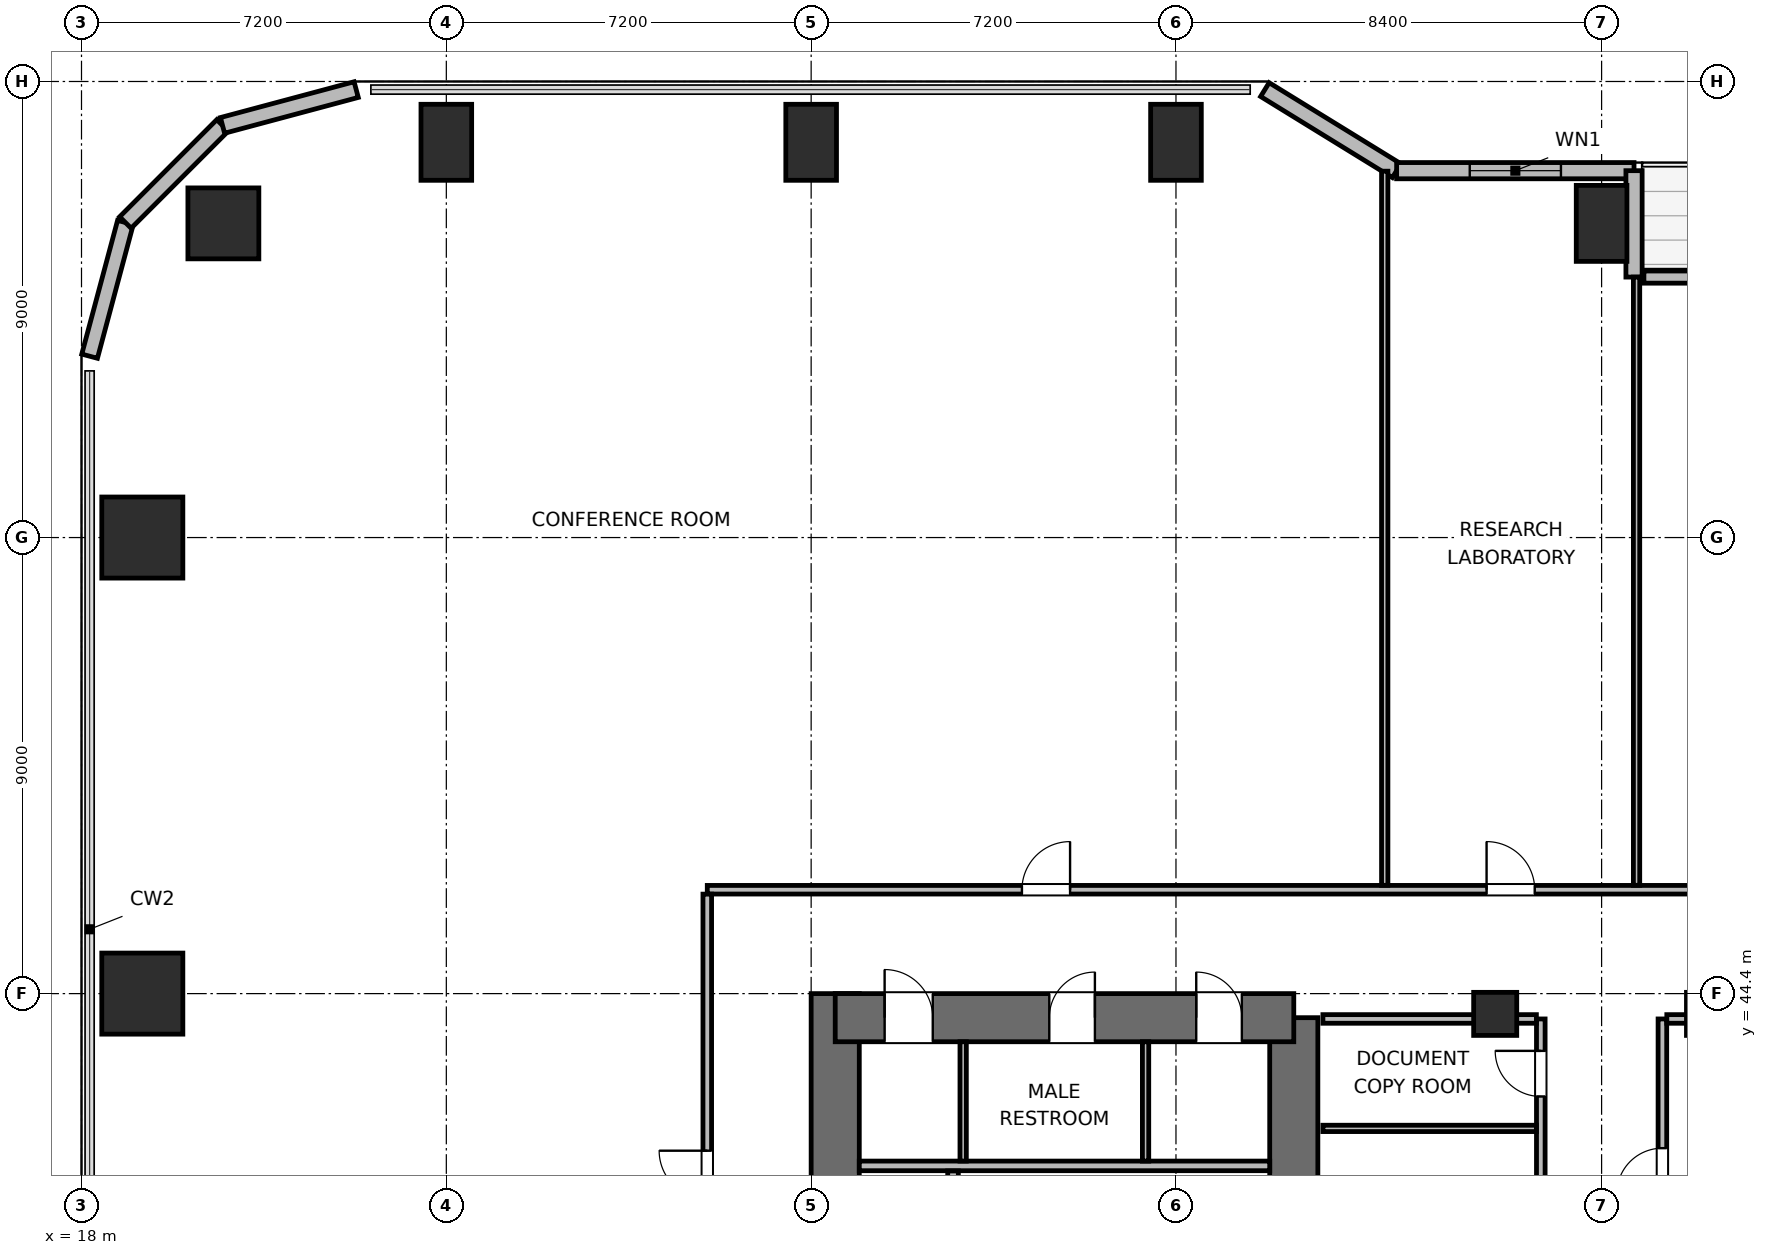
"""IFC4 building model, lengths in metres.
Left out: names, types, materials, properties, quantities, classifications, styles, units other than length and angle.
Written with IfcOpenShell. Run it as: python <this file> out.ifc"""

import sys

from ifc_helpers import new_model, si_unit, direction, frame, frame_2d, origin, origin_2d, place, context, subcontext, project, spatial, rectangle, circle, extrude, element, fill, save


model = new_model("IFC4")
c1 = context("Model", 3, precision=1e-05, world=origin(), true_north=direction((0.0, 1.0)))
c2 = subcontext(c1, "Body", "Model", "MODEL_VIEW")
j1 = project(units=[si_unit("LENGTHUNIT", "METRE"), si_unit("PLANEANGLEUNIT", "RADIAN")], contexts=[c1])
p1 = place(None, origin())
s1 = spatial("IfcSite", under=j1, at=p1, CompositionType="ELEMENT")
p2 = place(p1, origin())
s2 = spatial("IfcBuilding", under=s1, at=p2, CompositionType="ELEMENT")
p3 = place(p2, frame((0.0, 0.0, 29.4)))
s3 = spatial("IfcBuildingStorey", under=s2, at=p3, CompositionType="ELEMENT", Elevation=29.4)
p4 = place(p3, frame((32.875, 27.6, 0.0), z_axis=(0.0, 0.0, 1.0), x_axis=(0.0, 1.0, 0.0)))
e1 = element("IfcWall", 1, at=p4, inside=s3, PredefinedType="SHEAR", context=c2, shape_type="SweptSolid", body=[
    extrude(rectangle(XDim=16.8, YDim=0.95, at=frame_2d((8.4, 0.0))), origin(), (0.0, 0.0, 1.0), 3.9),
])
p5 = place(p3, frame((41.925, 37.8, 0.0), z_axis=(0.0, 0.0, 1.0), x_axis=(0.0, 1.0, 0.0)))
e2 = element("IfcWall", 2, at=p5, inside=s3, PredefinedType="SHEAR", context=c2, shape_type="SweptSolid", body=[
    extrude(rectangle(XDim=6.125, YDim=0.95, at=frame_2d((3.062, 0.0))), origin(), (0.0, 0.0, 1.0), 3.9),
])
p6 = place(p3, frame((32.875, 43.925, 0.0), z_axis=(0.0, 0.0, 1.0), x_axis=(1.0, 0.0, 0.0)))
e3 = element("IfcWall", 3, at=p6, inside=s3, PredefinedType="SHEAR", context=c2, shape_type="SweptSolid", body=[
    extrude(rectangle(XDim=9.05, YDim=0.95, at=frame_2d((4.525, 0.0))), origin(), (0.0, 0.0, 1.0), 3.9),
])
p7 = place(p6, frame((0.975, 0.0, 0.0)))
e4 = element("IfcOpeningElement", 4, at=p7, cuts=e3, PredefinedType="OPENING", context=c2, shape_type="SweptSolid", body=[
    extrude(rectangle(XDim=0.95, YDim=2.04, at=frame_2d((0.475, 1.02))), frame((0.0, 0.485, 0.0), z_axis=(0.0, -1.0, 0.0), x_axis=(1.0, 0.0, 0.0)), (0.0, 0.0, 1.0), 0.97),
])
p8 = place(p6, frame((4.225, 0.0, 0.0)))
e5 = element("IfcOpeningElement", 5, at=p8, cuts=e3, PredefinedType="OPENING", context=c2, shape_type="SweptSolid", body=[
    extrude(rectangle(XDim=0.9, YDim=2.02, at=frame_2d((0.45, 1.01))), frame((0.0, 0.485, 0.0), z_axis=(0.0, -1.0, 0.0), x_axis=(1.0, 0.0, 0.0)), (0.0, 0.0, 1.0), 0.97),
])
p9 = place(p6, frame((7.125, 0.0, 0.0)))
e6 = element("IfcOpeningElement", 6, at=p9, cuts=e3, PredefinedType="OPENING", context=c2, shape_type="SweptSolid", body=[
    extrude(rectangle(XDim=0.9, YDim=2.02, at=frame_2d((0.45, 1.01))), frame((0.0, 0.485, 0.0), z_axis=(0.0, -1.0, 0.0), x_axis=(1.0, 0.0, 0.0)), (0.0, 0.0, 1.0), 0.97),
])
p10 = place(p3, frame((20.8, 59.6, 0.0), z_axis=(0.0, 0.0, 1.0), x_axis=(1.0, 0.0, 0.0)))
e7 = element("IfcColumn", 7, at=p10, inside=s3, PredefinedType="COLUMN", context=c2, shape_type="SweptSolid", body=[
    extrude(circle(Radius=0.7, at=origin_2d()), origin(), (0.0, 0.0, 1.0), 3.9),
])
for number, where, z_axis, x_axis in (
    (8, (25.2, 61.2, 0.0), (0.0, 0.0, 1.0), (1.0, 0.0, 0.0)),
    (9, (32.4, 61.2, 0.0), (0.0, 0.0, 1.0), (1.0, 0.0, 0.0)),
    (10, (39.6, 61.2, 0.0), (0.0, 0.0, 1.0), (1.0, 0.0, 0.0)),
    (11, (48.0, 59.6, 0.0), (0.0, 0.0, 1.0), (1.0, 0.0, 0.0)),
):
    element("IfcColumn", number, at=place(p3, frame(where, z_axis=z_axis, x_axis=x_axis)), inside=s3, PredefinedType="COLUMN", context=c2, shape_type="SweptSolid", body=[
        extrude(rectangle(XDim=1.0, YDim=1.5, at=origin_2d()), origin(), (0.0, 0.0, 1.0), 3.9),
    ])
for number, where, z_axis, x_axis in (
    (12, (19.2, 44.4, 0.0), (0.0, 0.0, 1.0), (1.0, 0.0, 0.0)),
    (13, (19.2, 53.4, 0.0), (0.0, 0.0, 1.0), (1.0, 0.0, 0.0)),
):
    element("IfcColumn", number, at=place(p3, frame(where, z_axis=z_axis, x_axis=x_axis)), inside=s3, PredefinedType="COLUMN", context=c2, shape_type="SweptSolid", body=[
        extrude(rectangle(XDim=1.6, YDim=1.6, at=origin_2d()), origin(), (0.0, 0.0, 1.0), 3.9),
    ])
for number, where, z_axis, x_axis in (
    (14, (45.9, 44.0, 0.0), (0.0, 0.0, 1.0), (1.0, 0.0, 0.0)),
    (15, (50.1, 44.0, 0.0), (0.0, 0.0, 1.0), (1.0, 0.0, 0.0)),
):
    element("IfcColumn", number, at=place(p3, frame(where, z_axis=z_axis, x_axis=x_axis)), inside=s3, PredefinedType="COLUMN", context=c2, shape_type="SweptSolid", body=[
        extrude(rectangle(XDim=0.85, YDim=0.85, at=origin_2d()), origin(), (0.0, 0.0, 1.0), 3.9),
    ])
p11 = place(p3, frame((18.16, 56.979, 0.0), z_axis=(0.0, 0.0, 1.0), x_axis=(0.25869736047, 0.965958423373, 0.0)))
e16 = element("IfcWall", 16, at=p11, inside=s3, PredefinedType="SOLIDWALL", context=c2, shape_type="SweptSolid", body=[
    extrude(rectangle(XDim=2.731, YDim=0.32, at=frame_2d((1.366, 0.0))), origin(), (0.0, 0.0, 1.0), 3.64),
])
p12 = place(p3, frame((18.866, 59.617, 0.0), z_axis=(0.0, 0.0, 1.0), x_axis=(0.707106781187, 0.707106781187, 0.0)))
e17 = element("IfcWall", 17, at=p12, inside=s3, PredefinedType="SOLIDWALL", context=c2, shape_type="SweptSolid", body=[
    extrude(rectangle(XDim=2.71, YDim=0.32, at=frame_2d((1.355, 0.0))), origin(), (0.0, 0.0, 1.0), 3.64),
])
p13 = place(p3, frame((20.783, 61.533, 0.0), z_axis=(0.0, 0.0, 1.0), x_axis=(0.965964405026, 0.25867502435, 0.0)))
e18 = element("IfcWall", 18, at=p13, inside=s3, PredefinedType="SOLIDWALL", context=c2, shape_type="SweptSolid", body=[
    extrude(rectangle(XDim=2.731, YDim=0.32, at=frame_2d((1.366, 0.0))), origin(), (0.0, 0.0, 1.0), 3.64),
])
p14 = place(p3, frame((41.355, 62.24, 0.0), z_axis=(0.0, 0.0, 1.0), x_axis=(0.851630857047, -0.524142044989, 0.0)))
e19 = element("IfcWall", 19, at=p14, inside=s3, PredefinedType="SOLIDWALL", context=c2, shape_type="SweptSolid", body=[
    extrude(rectangle(XDim=3.053, YDim=0.32, at=frame_2d((1.526, 0.0))), origin(), (0.0, 0.0, 1.0), 2.875),
])
p15 = place(p3, frame((43.955, 60.64, 0.0), z_axis=(0.0, 0.0, 1.0), x_axis=(1.0, 0.0, 0.0)))
e20 = element("IfcWall", 20, at=p15, inside=s3, PredefinedType="SOLIDWALL", context=c2, shape_type="SweptSolid", body=[
    extrude(rectangle(XDim=4.685, YDim=0.32, at=frame_2d((2.343, 0.0))), origin(), (0.0, 0.0, 1.0), 2.875),
])
p16 = place(p15, frame((1.443, 0.0, 0.85)))
e21 = element("IfcOpeningElement", 21, at=p16, cuts=e20, PredefinedType="OPENING", context=c2, shape_type="SweptSolid", body=[
    extrude(rectangle(XDim=1.8, YDim=1.1, at=frame_2d((0.9, 0.55))), frame((0.0, 0.17, 0.0), z_axis=(0.0, -1.0, 0.0), x_axis=(1.0, 0.0, 0.0)), (0.0, 0.0, 1.0), 0.34),
])
p17 = place(p3, frame((48.64, 60.64, 0.0), z_axis=(0.0, 0.0, 1.0), x_axis=(0.0, -1.0, 0.0)))
e22 = element("IfcWall", 22, at=p17, inside=s3, PredefinedType="SOLIDWALL", context=c2, shape_type="SweptSolid", body=[
    extrude(rectangle(XDim=2.1, YDim=0.32, at=frame_2d((1.05, 0.0))), origin(), (0.0, 0.0, 1.0), 2.875),
])
p18 = place(p3, frame((48.835, 58.54, 0.0), z_axis=(0.0, 0.0, 1.0), x_axis=(1.0, 0.0, 0.0)))
e23 = element("IfcWall", 23, at=p18, inside=s3, PredefinedType="SOLIDWALL", context=c2, shape_type="SweptSolid", body=[
    extrude(rectangle(XDim=4.53, YDim=0.24, at=frame_2d((2.265, 0.0))), origin(), (0.0, 0.0, 1.0), 3.64),
])
p19 = place(p18, frame((1.715, 0.0, 0.0)))
e24 = element("IfcOpeningElement", 24, at=p19, cuts=e23, PredefinedType="OPENING", context=c2, shape_type="SweptSolid", body=[
    extrude(rectangle(XDim=1.1, YDim=2.04, at=frame_2d((0.55, 1.02))), frame((0.0, 0.13, 0.0), z_axis=(0.0, -1.0, 0.0), x_axis=(1.0, 0.0, 0.0)), (0.0, 0.0, 1.0), 0.26),
])
p20 = place(p3, frame((33.35, 41.0, 0.0), z_axis=(0.0, 0.0, 1.0), x_axis=(1.0, 0.0, 0.0)))
e25 = element("IfcWall", 25, at=p20, inside=s3, PredefinedType="PLUMBINGWALL", context=c2, shape_type="SweptSolid", body=[
    extrude(rectangle(XDim=8.1, YDim=0.19, at=frame_2d((4.05, 0.0))), origin(), (0.0, 0.0, 1.0), 3.64),
])
for number, where, z_axis, x_axis in (
    (26, (35.4, 41.095, 0.0), (0.0, 0.0, 1.0), (0.0, 1.0, 0.0)),
    (27, (39.0, 41.095, 0.0), (0.0, 0.0, 1.0), (0.0, 1.0, 0.0)),
):
    element("IfcWall", number, at=place(p3, frame(where, z_axis=z_axis, x_axis=x_axis)), inside=s3, PredefinedType="PARTITIONING", context=c2, shape_type="SweptSolid", body=[
        extrude(rectangle(XDim=2.355, YDim=0.125, at=frame_2d((1.177, 0.0))), origin(), (0.0, 0.0, 1.0), 3.64),
    ])
p21 = place(p3, frame((35.2, 39.58, 0.0), z_axis=(0.0, 0.0, 1.0), x_axis=(0.0, 1.0, 0.0)))
e28 = element("IfcWall", 28, at=p21, inside=s3, PredefinedType="PARTITIONING", context=c2, shape_type="SweptSolid", body=[
    extrude(rectangle(XDim=1.32, YDim=0.21, at=frame_2d((0.66, 0.0))), origin(), (0.0, 0.0, 1.0), 3.64),
])
p22 = place(p3, frame((46.8, 37.9, 0.0), z_axis=(0.0, 0.0, 1.0), x_axis=(0.0, 1.0, 0.0)))
e29 = element("IfcWall", 29, at=p22, inside=s3, PredefinedType="PARTITIONING", context=c2, shape_type="SweptSolid", body=[
    extrude(rectangle(XDim=6.0, YDim=0.17, at=frame_2d((3.0, 0.0))), origin(), (0.0, 0.0, 1.0), 3.64),
])
p23 = place(p22, frame((1.47, 0.0, 0.0)))
e30 = element("IfcOpeningElement", 30, at=p23, cuts=e29, PredefinedType="OPENING", context=c2, shape_type="SweptSolid", body=[
    extrude(rectangle(XDim=0.9, YDim=2.02, at=frame_2d((0.45, 1.01))), frame((0.0, 0.095, 0.0), z_axis=(0.0, -1.0, 0.0), x_axis=(1.0, 0.0, 0.0)), (0.0, 0.0, 1.0), 0.19),
])
p24 = place(p22, frame((4.47, 0.0, 0.0)))
e31 = element("IfcOpeningElement", 31, at=p24, cuts=e29, PredefinedType="OPENING", context=c2, shape_type="SweptSolid", body=[
    extrude(rectangle(XDim=0.9, YDim=2.02, at=frame_2d((0.45, 1.01))), frame((0.0, 0.095, 0.0), z_axis=(0.0, -1.0, 0.0), x_axis=(1.0, 0.0, 0.0)), (0.0, 0.0, 1.0), 0.19),
])
p25 = place(p3, frame((42.5, 43.9, 0.0), z_axis=(0.0, 0.0, 1.0), x_axis=(1.0, 0.0, 0.0)))
e32 = element("IfcWall", 32, at=p25, inside=s3, PredefinedType="PARTITIONING", context=c2, shape_type="SweptSolid", body=[
    extrude(rectangle(XDim=4.213, YDim=0.17, at=frame_2d((2.106, 0.0))), origin(), (0.0, 0.0, 1.0), 2.525),
])
p26 = place(p3, frame((42.5, 41.74, 0.0), z_axis=(0.0, 0.0, 1.0), x_axis=(1.0, 0.0, 0.0)))
e33 = element("IfcWall", 33, at=p26, inside=s3, PredefinedType="PARTITIONING", context=c2, shape_type="SweptSolid", body=[
    extrude(rectangle(XDim=4.213, YDim=0.125, at=frame_2d((2.106, 0.0))), origin(), (0.0, 0.0, 1.0), 3.64),
])
p27 = place(p3, frame((49.2, 37.9, 0.0), z_axis=(0.0, 0.0, 1.0), x_axis=(0.0, 1.0, 0.0)))
e34 = element("IfcWall", 34, at=p27, inside=s3, PredefinedType="PARTITIONING", context=c2, shape_type="SweptSolid", body=[
    extrude(rectangle(XDim=6.0, YDim=0.17, at=frame_2d((3.0, 0.0))), origin(), (0.0, 0.0, 1.0), 3.64),
])
p28 = place(p27, frame((2.55, 0.0, 0.0)))
e35 = element("IfcOpeningElement", 35, at=p28, cuts=e34, PredefinedType="OPENING", context=c2, shape_type="SweptSolid", body=[
    extrude(rectangle(XDim=0.9, YDim=2.02, at=frame_2d((0.45, 1.01))), frame((0.0, 0.095, 0.0), z_axis=(0.0, -1.0, 0.0), x_axis=(1.0, 0.0, 0.0)), (0.0, 0.0, 1.0), 0.19),
])
p29 = place(p3, frame((49.287, 43.9, 0.0), z_axis=(0.0, 0.0, 1.0), x_axis=(1.0, 0.0, 0.0)))
e36 = element("IfcWall", 36, at=p29, inside=s3, PredefinedType="PARTITIONING", context=c2, shape_type="SweptSolid", body=[
    extrude(rectangle(XDim=4.113, YDim=0.17, at=frame_2d((2.056, 0.0))), origin(), (0.0, 0.0, 1.0), 2.525),
])
p30 = place(p3, frame((30.35, 46.45, 0.0), z_axis=(0.0, 0.0, 1.0), x_axis=(1.0, 0.0, 0.0)))
e37 = element("IfcWall", 37, at=p30, inside=s3, PredefinedType="PARTITIONING", context=c2, shape_type="SweptSolid", body=[
    extrude(rectangle(XDim=35.3, YDim=0.17, at=frame_2d((17.65, 0.0))), origin(), (0.0, 0.0, 1.0), 3.64),
])
p31 = place(p30, frame((6.21, 0.0, 0.0)))
e38 = element("IfcOpeningElement", 38, at=p31, cuts=e37, PredefinedType="OPENING", context=c2, shape_type="SweptSolid", body=[
    extrude(rectangle(XDim=0.95, YDim=2.04, at=frame_2d((0.475, 1.02))), frame((0.0, 0.095, 0.0), z_axis=(0.0, -1.0, 0.0), x_axis=(1.0, 0.0, 0.0)), (0.0, 0.0, 1.0), 0.19),
])
p32 = place(p30, frame((15.38, 0.0, 0.0)))
e39 = element("IfcOpeningElement", 39, at=p32, cuts=e37, PredefinedType="OPENING", context=c2, shape_type="SweptSolid", body=[
    extrude(rectangle(XDim=0.95, YDim=2.04, at=frame_2d((0.475, 1.02))), frame((0.0, 0.095, 0.0), z_axis=(0.0, -1.0, 0.0), x_axis=(1.0, 0.0, 0.0)), (0.0, 0.0, 1.0), 0.19),
])
p33 = place(p30, frame((26.345, 0.0, 0.0)))
e40 = element("IfcOpeningElement", 40, at=p33, cuts=e37, PredefinedType="OPENING", context=c2, shape_type="SweptSolid", body=[
    extrude(rectangle(XDim=0.95, YDim=2.04, at=frame_2d((0.475, 1.02))), frame((0.0, 0.095, 0.0), z_axis=(0.0, -1.0, 0.0), x_axis=(1.0, 0.0, 0.0)), (0.0, 0.0, 1.0), 0.19),
])
p34 = place(p3, frame((30.35, 25.637, 0.0), z_axis=(0.0, 0.0, 1.0), x_axis=(0.0, 1.0, 0.0)))
e41 = element("IfcWall", 41, at=p34, inside=s3, PredefinedType="PARTITIONING", context=c2, shape_type="SweptSolid", body=[
    extrude(rectangle(XDim=20.726, YDim=0.17, at=frame_2d((10.363, 0.0))), origin(), (0.0, 0.0, 1.0), 3.64),
])
p35 = place(p34, frame((4.263, 0.0, 0.0)))
e42 = element("IfcOpeningElement", 42, at=p35, cuts=e41, PredefinedType="OPENING", context=c2, shape_type="SweptSolid", body=[
    extrude(rectangle(XDim=0.95, YDim=2.04, at=frame_2d((0.475, 1.02))), frame((0.0, 0.095, 0.0), z_axis=(0.0, -1.0, 0.0), x_axis=(1.0, 0.0, 0.0)), (0.0, 0.0, 1.0), 0.19),
])
p36 = place(p34, frame((14.713, 0.0, 0.0)))
e43 = element("IfcOpeningElement", 43, at=p36, cuts=e41, PredefinedType="OPENING", context=c2, shape_type="SweptSolid", body=[
    extrude(rectangle(XDim=0.95, YDim=2.04, at=frame_2d((0.475, 1.02))), frame((0.0, 0.095, 0.0), z_axis=(0.0, -1.0, 0.0), x_axis=(1.0, 0.0, 0.0)), (0.0, 0.0, 1.0), 0.19),
])
p37 = place(p3, frame((43.72, 46.537, 0.0), z_axis=(0.0, 0.0, 1.0), x_axis=(0.0, 1.0, 0.0)))
e44 = element("IfcWall", 44, at=p37, inside=s3, PredefinedType="PARTITIONING", context=c2, shape_type="SweptSolid", body=[
    extrude(rectangle(XDim=14.093, YDim=0.125, at=frame_2d((7.046, 0.0))), origin(), (0.0, 0.0, 1.0), 3.003),
])
p38 = place(p3, frame((48.69, 46.537, 0.0), z_axis=(0.0, 0.0, 1.0), x_axis=(0.0, 1.0, 0.0)))
e45 = element("IfcWall", 45, at=p38, inside=s3, PredefinedType="PARTITIONING", context=c2, shape_type="SweptSolid", body=[
    extrude(rectangle(XDim=12.003, YDim=0.125, at=frame_2d((6.001, 0.0))), origin(), (0.0, 0.0, 1.0), 3.64),
])
p39 = place(p16, origin())
e46 = element("IfcWindow", 46, at=p39, inside=s3, PartitioningType="SINGLE_PANEL", PredefinedType="WINDOW", context=c2, shape_type="SweptSolid", body=[
    extrude(rectangle(XDim=1.8, YDim=1.1, at=frame_2d((0.9, 0.55))), frame((0.0, 0.03, 0.0), z_axis=(0.0, -1.0, 0.0), x_axis=(1.0, 0.0, 0.0)), (0.0, 0.0, 1.0), 0.06),
])
fill(e21, e46)
p40 = place(p7, origin())
e47 = element("IfcDoor", 47, at=p40, inside=s3, OperationType="SINGLE_SWING_LEFT", PredefinedType="DOOR", context=c2, shape_type="SweptSolid", body=[
    extrude(rectangle(XDim=0.95, YDim=2.04, at=frame_2d((0.475, 1.02))), frame((0.0, 0.025, 0.0), z_axis=(0.0, -1.0, 0.0), x_axis=(1.0, 0.0, 0.0)), (0.0, 0.0, 1.0), 0.05),
])
fill(e4, e47)
p41 = place(p8, origin())
e48 = element("IfcDoor", 48, at=p41, inside=s3, OperationType="SINGLE_SWING_RIGHT", PredefinedType="DOOR", context=c2, shape_type="SweptSolid", body=[
    extrude(rectangle(XDim=0.9, YDim=2.02, at=frame_2d((0.45, 1.01))), frame((0.0, 0.025, 0.0), z_axis=(0.0, -1.0, 0.0), x_axis=(1.0, 0.0, 0.0)), (0.0, 0.0, 1.0), 0.05),
])
fill(e5, e48)
p42 = place(p9, origin())
e49 = element("IfcDoor", 49, at=p42, inside=s3, OperationType="SINGLE_SWING_LEFT", PredefinedType="DOOR", context=c2, shape_type="SweptSolid", body=[
    extrude(rectangle(XDim=0.9, YDim=2.02, at=frame_2d((0.45, 1.01))), frame((0.0, 0.025, 0.0), z_axis=(0.0, -1.0, 0.0), x_axis=(1.0, 0.0, 0.0)), (0.0, 0.0, 1.0), 0.05),
])
fill(e6, e49)
p43 = place(p24, origin())
e50 = element("IfcDoor", 50, at=p43, inside=s3, OperationType="SINGLE_SWING_RIGHT", PredefinedType="DOOR", context=c2, shape_type="SweptSolid", body=[
    extrude(rectangle(XDim=0.9, YDim=2.02, at=frame_2d((0.45, 1.01))), frame((0.0, 0.025, 0.0), z_axis=(0.0, -1.0, 0.0), x_axis=(1.0, 0.0, 0.0)), (0.0, 0.0, 1.0), 0.05),
])
fill(e31, e50)
p44 = place(p28, origin())
e51 = element("IfcDoor", 51, at=p44, inside=s3, OperationType="SINGLE_SWING_LEFT", PredefinedType="DOOR", context=c2, shape_type="SweptSolid", body=[
    extrude(rectangle(XDim=0.9, YDim=2.02, at=frame_2d((0.45, 1.01))), frame((0.0, 0.025, 0.0), z_axis=(0.0, -1.0, 0.0), x_axis=(1.0, 0.0, 0.0)), (0.0, 0.0, 1.0), 0.05),
])
fill(e35, e51)
p45 = place(p31, origin())
e52 = element("IfcDoor", 52, at=p45, inside=s3, OperationType="SINGLE_SWING_RIGHT", PredefinedType="DOOR", context=c2, shape_type="SweptSolid", body=[
    extrude(rectangle(XDim=0.95, YDim=2.04, at=frame_2d((0.475, 1.02))), frame((0.0, 0.025, 0.0), z_axis=(0.0, -1.0, 0.0), x_axis=(1.0, 0.0, 0.0)), (0.0, 0.0, 1.0), 0.05),
])
fill(e38, e52)
p46 = place(p32, origin())
e53 = element("IfcDoor", 53, at=p46, inside=s3, OperationType="SINGLE_SWING_LEFT", PredefinedType="DOOR", context=c2, shape_type="SweptSolid", body=[
    extrude(rectangle(XDim=0.95, YDim=2.04, at=frame_2d((0.475, 1.02))), frame((0.0, 0.025, 0.0), z_axis=(0.0, -1.0, 0.0), x_axis=(1.0, 0.0, 0.0)), (0.0, 0.0, 1.0), 0.05),
])
fill(e39, e53)
p47 = place(p36, origin())
e54 = element("IfcDoor", 54, at=p47, inside=s3, OperationType="SINGLE_SWING_RIGHT", PredefinedType="DOOR", context=c2, shape_type="SweptSolid", body=[
    extrude(rectangle(XDim=0.95, YDim=2.04, at=frame_2d((0.475, 1.02))), frame((0.0, 0.025, 0.0), z_axis=(0.0, -1.0, 0.0), x_axis=(1.0, 0.0, 0.0)), (0.0, 0.0, 1.0), 0.05),
])
fill(e43, e54)
save(model, sys.argv[1])
